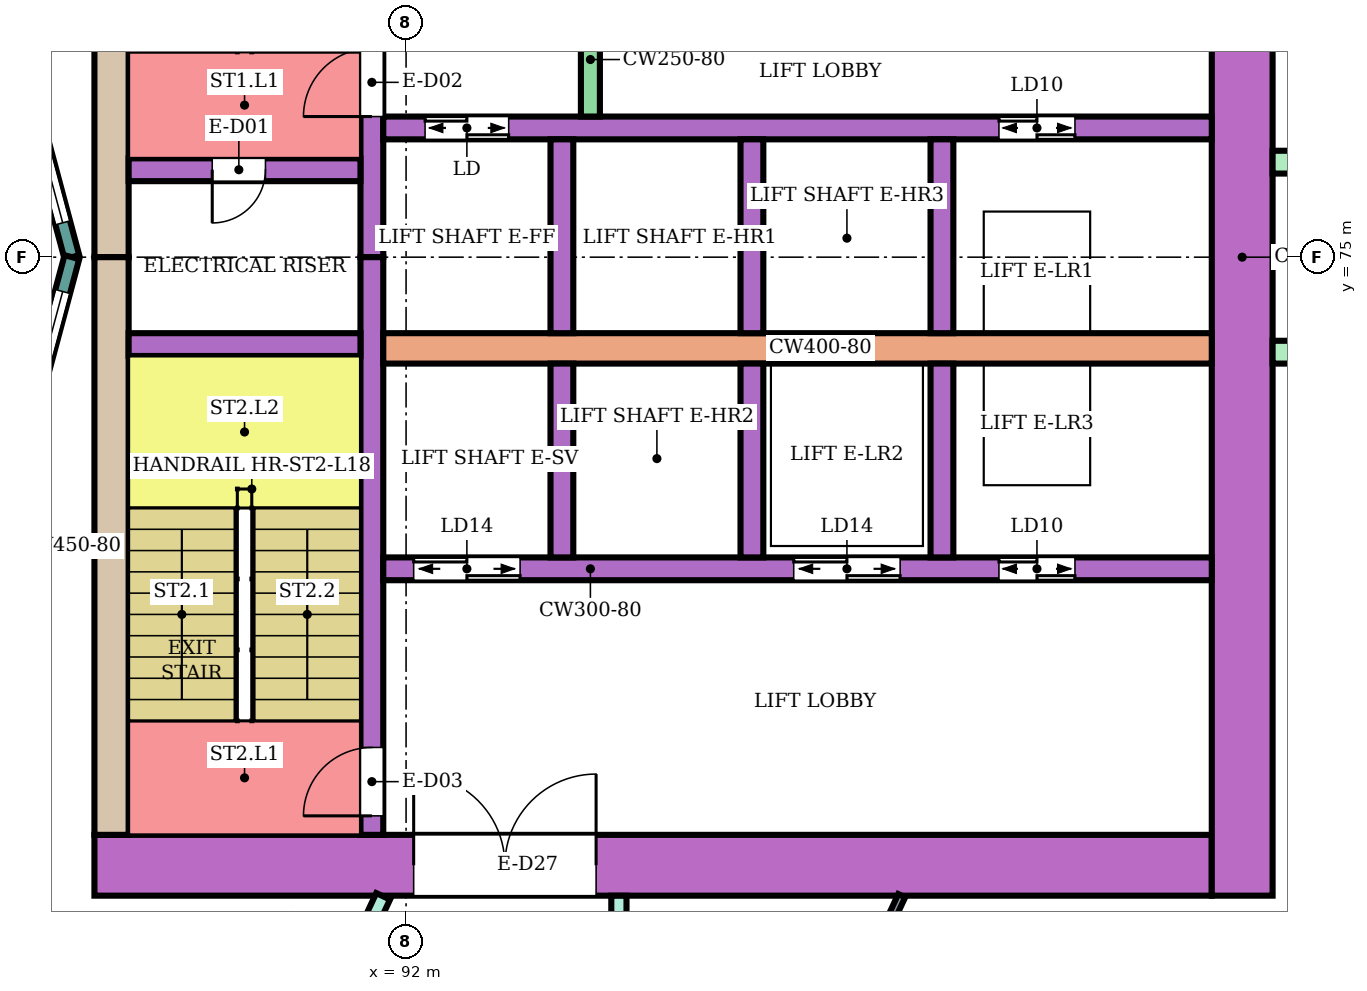
"""IFC4 building model, lengths in metres.
Left out: names, types, materials, properties, quantities, classifications, styles, units other than length and angle.
Written with IfcOpenShell. Run it as: python <this file> out.ifc"""

import sys

from ifc_helpers import new_model, si_unit, direction, frame, frame_2d, origin, place, context, subcontext, project, spatial, rectangle, extrude, element, fill, save


model = new_model("IFC4")
c1 = context("Model", 3, precision=1e-05, world=origin(), true_north=direction((0.0, 1.0)))
c2 = subcontext(c1, "Body", "Model", "MODEL_VIEW")
j1 = project(units=[si_unit("LENGTHUNIT", "METRE"), si_unit("PLANEANGLEUNIT", "RADIAN")], contexts=[c1])
p1 = place(None, origin())
s1 = spatial("IfcSite", under=j1, at=p1, CompositionType="ELEMENT")
p2 = place(p1, origin())
s2 = spatial("IfcBuilding", under=s1, at=p2, CompositionType="ELEMENT")
p3 = place(p2, frame((0.0, 0.0, 82.4)))
s3 = spatial("IfcBuildingStorey", under=s2, at=p3, CompositionType="ELEMENT", Elevation=82.4)
p4 = place(p3, frame((87.9, 67.0, 0.0), z_axis=(0.0, 0.0, 1.0), x_axis=(1.0, 0.0, 0.0)))
e1 = element("IfcWall", 1, at=p4, inside=s3, PredefinedType="SHEAR", context=c2, shape_type="SweptSolid", body=[
    extrude(rectangle(XDim=14.7, YDim=0.8, at=frame_2d((7.35, 0.0))), origin(), (0.0, 0.0, 1.0), 3.48),
])
p5 = place(p4, frame((4.2, 0.0, 0.0)))
e2 = element("IfcOpeningElement", 2, at=p5, cuts=e1, PredefinedType="OPENING", context=c2, shape_type="SweptSolid", body=[
    extrude(rectangle(XDim=2.4, YDim=2.4, at=frame_2d((1.2, 1.2))), frame((0.0, 0.41, 0.0), z_axis=(0.0, -1.0, 0.0), x_axis=(1.0, 0.0, 0.0)), (0.0, 0.0, 1.0), 0.82),
])
for number, where, z_axis, x_axis in (
    (3, (88.125, 75.0, 0.0), (0.0, 0.0, 1.0), (0.0, 1.0, 0.0)),
    (4, (88.125, 67.4, 0.0), (0.0, 0.0, 1.0), (0.0, 1.0, 0.0)),
):
    element("IfcWall", number, at=place(p3, frame(where, z_axis=z_axis, x_axis=x_axis)), inside=s3, PredefinedType="SHEAR", context=c2, shape_type="SweptSolid", body=[
        extrude(rectangle(XDim=7.6, YDim=0.45, at=frame_2d((3.8, 0.0))), origin(), (0.0, 0.0, 1.0), 3.48),
    ])
p6 = place(p3, frame((103.0, 66.6, 0.0), z_axis=(0.0, 0.0, 1.0), x_axis=(0.0, 1.0, 0.0)))
e5 = element("IfcWall", 5, at=p6, inside=s3, PredefinedType="SHEAR", context=c2, shape_type="SweptSolid", body=[
    extrude(rectangle(XDim=16.8, YDim=0.8, at=frame_2d((8.4, 0.0))), origin(), (0.0, 0.0, 1.0), 3.48),
])
p7 = place(p3, frame((91.55, 75.0, 0.0), z_axis=(0.0, 0.0, 1.0), x_axis=(0.0, 1.0, 0.0)))
e6 = element("IfcWall", 6, at=p7, inside=s3, PredefinedType="SHEAR", context=c2, shape_type="SweptSolid", body=[
    extrude(rectangle(XDim=7.6, YDim=0.3, at=frame_2d((3.8, 0.0))), origin(), (0.0, 0.0, 1.0), 3.48),
])
p8 = place(p7, frame((1.85, 0.0, 0.0)))
e7 = element("IfcOpeningElement", 7, at=p8, cuts=e6, PredefinedType="OPENING", context=c2, shape_type="SweptSolid", body=[
    extrude(rectangle(XDim=0.9, YDim=2.1, at=frame_2d((0.45, 1.05))), frame((0.0, 0.16, 0.0), z_axis=(0.0, -1.0, 0.0), x_axis=(1.0, 0.0, 0.0)), (0.0, 0.0, 1.0), 0.32),
])
p9 = place(p3, frame((91.55, 67.4, 0.0), z_axis=(0.0, 0.0, 1.0), x_axis=(0.0, 1.0, 0.0)))
e8 = element("IfcWall", 8, at=p9, inside=s3, PredefinedType="SHEAR", context=c2, shape_type="SweptSolid", body=[
    extrude(rectangle(XDim=7.6, YDim=0.3, at=frame_2d((3.8, 0.0))), origin(), (0.0, 0.0, 1.0), 3.48),
])
p10 = place(p9, frame((0.25, 0.0, 0.0)))
e9 = element("IfcOpeningElement", 9, at=p10, cuts=e8, PredefinedType="OPENING", context=c2, shape_type="SweptSolid", body=[
    extrude(rectangle(XDim=0.9, YDim=2.1, at=frame_2d((0.45, 1.05))), frame((0.0, 0.16, 0.0), z_axis=(0.0, -1.0, 0.0), x_axis=(1.0, 0.0, 0.0)), (0.0, 0.0, 1.0), 0.32),
])
p11 = place(p3, frame((88.35, 76.15, 0.0), z_axis=(0.0, 0.0, 1.0), x_axis=(1.0, 0.0, 0.0)))
e10 = element("IfcWall", 10, at=p11, inside=s3, PredefinedType="SHEAR", context=c2, shape_type="SweptSolid", body=[
    extrude(rectangle(XDim=3.05, YDim=0.3, at=frame_2d((1.525, 0.0))), origin(), (0.0, 0.0, 1.0), 3.48),
])
p12 = place(p11, frame((1.1, 0.0, 0.0)))
e11 = element("IfcOpeningElement", 11, at=p12, cuts=e10, PredefinedType="OPENING", context=c2, shape_type="SweptSolid", body=[
    extrude(rectangle(XDim=0.7, YDim=2.0, at=frame_2d((0.35, 1.0))), frame((0.0, 0.16, 0.0), z_axis=(0.0, -1.0, 0.0), x_axis=(1.0, 0.0, 0.0)), (0.0, 0.0, 1.0), 0.32),
])
p13 = place(p3, frame((88.35, 73.85, 0.0), z_axis=(0.0, 0.0, 1.0), x_axis=(1.0, 0.0, 0.0)))
e12 = element("IfcWall", 12, at=p13, inside=s3, PredefinedType="SHEAR", context=c2, shape_type="SweptSolid", body=[
    extrude(rectangle(XDim=3.05, YDim=0.3, at=frame_2d((1.525, 0.0))), origin(), (0.0, 0.0, 1.0), 3.48),
])
p14 = place(p3, frame((91.7, 76.7, 0.0), z_axis=(0.0, 0.0, 1.0), x_axis=(1.0, 0.0, 0.0)))
e13 = element("IfcWall", 13, at=p14, inside=s3, PredefinedType="SHEAR", context=c2, shape_type="SweptSolid", body=[
    extrude(rectangle(XDim=10.9, YDim=0.3, at=frame_2d((5.45, 0.0))), origin(), (0.0, 0.0, 1.0), 3.48),
])
p15 = place(p14, frame((0.55, 0.0, 0.0)))
e14 = element("IfcOpeningElement", 14, at=p15, cuts=e13, PredefinedType="OPENING", context=c2, shape_type="SweptSolid", body=[
    extrude(rectangle(XDim=1.1, YDim=2.1, at=frame_2d((0.55, 1.05))), frame((0.0, 0.16, 0.0), z_axis=(0.0, -1.0, 0.0), x_axis=(1.0, 0.0, 0.0)), (0.0, 0.0, 1.0), 0.32),
])
p16 = place(p14, frame((8.1, 0.0, 0.0)))
e15 = element("IfcOpeningElement", 15, at=p16, cuts=e13, PredefinedType="OPENING", context=c2, shape_type="SweptSolid", body=[
    extrude(rectangle(XDim=1.0, YDim=2.1, at=frame_2d((0.5, 1.05))), frame((0.0, 0.16, 0.0), z_axis=(0.0, -1.0, 0.0), x_axis=(1.0, 0.0, 0.0)), (0.0, 0.0, 1.0), 0.32),
])
p17 = place(p3, frame((91.7, 73.8, 0.0), z_axis=(0.0, 0.0, 1.0), x_axis=(1.0, 0.0, 0.0)))
e16 = element("IfcWall", 16, at=p17, inside=s3, PredefinedType="SHEAR", context=c2, shape_type="SweptSolid", body=[
    extrude(rectangle(XDim=10.9, YDim=0.4, at=frame_2d((5.45, 0.0))), origin(), (0.0, 0.0, 1.0), 3.48),
])
p18 = place(p3, frame((91.7, 70.9, 0.0), z_axis=(0.0, 0.0, 1.0), x_axis=(1.0, 0.0, 0.0)))
e17 = element("IfcWall", 17, at=p18, inside=s3, PredefinedType="SHEAR", context=c2, shape_type="SweptSolid", body=[
    extrude(rectangle(XDim=10.9, YDim=0.3, at=frame_2d((5.45, 0.0))), origin(), (0.0, 0.0, 1.0), 3.48),
])
p19 = place(p18, frame((0.4, 0.0, 0.0)))
e18 = element("IfcOpeningElement", 18, at=p19, cuts=e17, PredefinedType="OPENING", context=c2, shape_type="SweptSolid", body=[
    extrude(rectangle(XDim=1.4, YDim=2.1, at=frame_2d((0.7, 1.05))), frame((0.0, 0.16, 0.0), z_axis=(0.0, -1.0, 0.0), x_axis=(1.0, 0.0, 0.0)), (0.0, 0.0, 1.0), 0.32),
])
p20 = place(p18, frame((5.4, 0.0, 0.0)))
e19 = element("IfcOpeningElement", 19, at=p20, cuts=e17, PredefinedType="OPENING", context=c2, shape_type="SweptSolid", body=[
    extrude(rectangle(XDim=1.4, YDim=2.1, at=frame_2d((0.7, 1.05))), frame((0.0, 0.16, 0.0), z_axis=(0.0, -1.0, 0.0), x_axis=(1.0, 0.0, 0.0)), (0.0, 0.0, 1.0), 0.32),
])
p21 = place(p18, frame((8.1, 0.0, 0.0)))
e20 = element("IfcOpeningElement", 20, at=p21, cuts=e17, PredefinedType="OPENING", context=c2, shape_type="SweptSolid", body=[
    extrude(rectangle(XDim=1.0, YDim=2.1, at=frame_2d((0.5, 1.05))), frame((0.0, 0.16, 0.0), z_axis=(0.0, -1.0, 0.0), x_axis=(1.0, 0.0, 0.0)), (0.0, 0.0, 1.0), 0.32),
])
for number, where, z_axis, x_axis in (
    (21, (94.05, 74.0, 0.0), (0.0, 0.0, 1.0), (0.0, 1.0, 0.0)),
    (22, (96.55, 74.0, 0.0), (0.0, 0.0, 1.0), (0.0, 1.0, 0.0)),
    (23, (99.05, 74.0, 0.0), (0.0, 0.0, 1.0), (0.0, 1.0, 0.0)),
    (24, (94.05, 71.05, 0.0), (0.0, 0.0, 1.0), (0.0, 1.0, 0.0)),
    (25, (96.55, 71.05, 0.0), (0.0, 0.0, 1.0), (0.0, 1.0, 0.0)),
    (26, (99.05, 71.05, 0.0), (0.0, 0.0, 1.0), (0.0, 1.0, 0.0)),
):
    element("IfcWall", number, at=place(p3, frame(where, z_axis=z_axis, x_axis=x_axis)), inside=s3, PredefinedType="SHEAR", context=c2, shape_type="SweptSolid", body=[
        extrude(rectangle(XDim=2.55, YDim=0.3, at=frame_2d((1.275, 0.0))), origin(), (0.0, 0.0, 1.0), 3.48),
    ])
p22 = place(p3, frame((94.425, 76.85, 0.0), z_axis=(0.0, 0.0, 1.0), x_axis=(0.0, 1.0, 0.0)))
e27 = element("IfcWall", 27, at=p22, inside=s3, PredefinedType="SHEAR", context=c2, shape_type="SweptSolid", body=[
    extrude(rectangle(XDim=1.5, YDim=0.25, at=frame_2d((0.75, 0.0))), origin(), (0.0, 0.0, 1.0), 3.48),
])
for number, where, z_axis, x_axis in (
    (28, (103.4, 73.75, 0.0), (0.0, 0.0, 1.0), (1.0, 0.0, 0.0)),
    (29, (103.4, 76.25, 0.0), (0.0, 0.0, 1.0), (1.0, 0.0, 0.0)),
):
    element("IfcWall", number, at=place(p3, frame(where, z_axis=z_axis, x_axis=x_axis)), inside=s3, PredefinedType="NOTDEFINED", context=c2, shape_type="SweptSolid", body=[
        extrude(rectangle(XDim=2.416, YDim=0.3, at=frame_2d((1.208, 0.0))), origin(), (0.0, 0.0, 1.0), 3.8),
    ])
p23 = place(p3, frame((87.604, 75.0, 0.0), z_axis=(0.0, 0.0, 1.0), x_axis=(-0.258789828301, 0.965933654434, 0.0)))
e30 = element("IfcWall", 30, at=p23, inside=s3, PredefinedType="NOTDEFINED", context=c2, shape_type="SweptSolid", body=[
    extrude(rectangle(XDim=3.936, YDim=0.2, at=frame_2d((1.968, 0.0))), origin(), (0.0, 0.0, 1.0), 3.8),
])
p24 = place(p23, frame((0.468, 0.0, 0.9)))
e31 = element("IfcOpeningElement", 31, at=p24, cuts=e30, PredefinedType="OPENING", context=c2, shape_type="SweptSolid", body=[
    extrude(rectangle(XDim=3.0, YDim=2.3, at=frame_2d((1.5, 1.15))), frame((0.0, 0.11, 0.0), z_axis=(0.0, -1.0, 0.0), x_axis=(1.0, 0.0, 0.0)), (0.0, 0.0, 1.0), 0.22),
])
p25 = place(p3, frame((86.585, 71.198, 0.0), z_axis=(0.0, 0.0, 1.0), x_axis=(0.258789828301, 0.965933654434, 0.0)))
e32 = element("IfcWall", 32, at=p25, inside=s3, PredefinedType="NOTDEFINED", context=c2, shape_type="SweptSolid", body=[
    extrude(rectangle(XDim=3.936, YDim=0.2, at=frame_2d((1.968, 0.0))), origin(), (0.0, 0.0, 1.0), 3.8),
])
p26 = place(p25, frame((0.468, 0.0, 0.9)))
e33 = element("IfcOpeningElement", 33, at=p26, cuts=e32, PredefinedType="OPENING", context=c2, shape_type="SweptSolid", body=[
    extrude(rectangle(XDim=3.0, YDim=2.3, at=frame_2d((1.5, 1.15))), frame((0.0, 0.11, 0.0), z_axis=(0.0, -1.0, 0.0), x_axis=(1.0, 0.0, 0.0)), (0.0, 0.0, 1.0), 0.22),
])
p27 = place(p3, frame((83.846, 68.33, 0.0), z_axis=(0.0, 0.0, 1.0), x_axis=(0.499822319857, -0.866127963163, 0.0)))
e34 = element("IfcWall", 34, at=p27, inside=s3, PredefinedType="PARTITIONING", context=c2, shape_type="SweptSolid", body=[
    extrude(rectangle(XDim=9.382, YDim=0.2, at=frame_2d((4.691, 0.0))), origin(), (0.0, 0.0, 1.0), 3.35),
])
p28 = place(p3, frame((88.501, 59.775, 0.0), z_axis=(0.0, 0.0, 1.0), x_axis=(0.424700525505, 0.905333896215, 0.0)))
e35 = element("IfcWall", 35, at=p28, inside=s3, PredefinedType="PARTITIONING", context=c2, shape_type="SweptSolid", body=[
    extrude(rectangle(XDim=7.53, YDim=0.2, at=frame_2d((3.765, 0.0))), origin(), (0.0, 0.0, 1.0), 3.35),
])
p29 = place(p28, frame((5.83, 0.0, 0.0)))
e36 = element("IfcOpeningElement", 36, at=p29, cuts=e35, PredefinedType="OPENING", context=c2, shape_type="SweptSolid", body=[
    extrude(rectangle(XDim=1.0, YDim=2.1, at=frame_2d((0.5, 1.05))), frame((0.0, 0.11, 0.0), z_axis=(0.0, -1.0, 0.0), x_axis=(1.0, 0.0, 0.0)), (0.0, 0.0, 1.0), 0.22),
])
p30 = place(p3, frame((94.8, 65.1, 0.0), z_axis=(0.0, 0.0, 1.0), x_axis=(0.0, 1.0, 0.0)))
e37 = element("IfcWall", 37, at=p30, inside=s3, PredefinedType="PARTITIONING", context=c2, shape_type="SweptSolid", body=[
    extrude(rectangle(XDim=1.499, YDim=0.2, at=frame_2d((0.75, 0.0))), origin(), (0.0, 0.0, 1.0), 3.35),
])
p31 = place(p3, frame((95.355, 59.806, 0.0), z_axis=(0.0, 0.0, 1.0), x_axis=(0.422407546544, 0.906406015328, 0.0)))
e38 = element("IfcWall", 38, at=p31, inside=s3, PredefinedType="PARTITIONING", context=c2, shape_type="SweptSolid", body=[
    extrude(rectangle(XDim=7.496, YDim=0.1, at=frame_2d((3.748, 0.0))), origin(), (0.0, 0.0, 1.0), 3.35),
])
p32 = place(p31, frame((3.238, 0.0, 0.0)))
e39 = element("IfcOpeningElement", 39, at=p32, cuts=e38, PredefinedType="OPENING", context=c2, shape_type="SweptSolid", body=[
    extrude(rectangle(XDim=0.9, YDim=2.1, at=frame_2d((0.45, 1.05))), frame((0.0, 0.06, 0.0), z_axis=(0.0, -1.0, 0.0), x_axis=(1.0, 0.0, 0.0)), (0.0, 0.0, 1.0), 0.12),
])
p33 = place(p24, origin())
e40 = element("IfcWindow", 40, at=p33, inside=s3, PartitioningType="SINGLE_PANEL", PredefinedType="WINDOW", context=c2, shape_type="SweptSolid", body=[
    extrude(rectangle(XDim=3.0, YDim=2.3, at=frame_2d((1.5, 1.15))), frame((0.0, 0.03, 0.0), z_axis=(0.0, -1.0, 0.0), x_axis=(1.0, 0.0, 0.0)), (0.0, 0.0, 1.0), 0.06),
])
fill(e31, e40)
p34 = place(p26, origin())
e41 = element("IfcWindow", 41, at=p34, inside=s3, PartitioningType="SINGLE_PANEL", PredefinedType="WINDOW", context=c2, shape_type="SweptSolid", body=[
    extrude(rectangle(XDim=3.0, YDim=2.3, at=frame_2d((1.5, 1.15))), frame((0.0, 0.03, 0.0), z_axis=(0.0, -1.0, 0.0), x_axis=(1.0, 0.0, 0.0)), (0.0, 0.0, 1.0), 0.06),
])
fill(e33, e41)
p35 = place(p12, frame((0.7, 0.0, 0.0), z_axis=(0.0, 0.0, 1.0), x_axis=(-1.0, 0.0, 0.0)))
e42 = element("IfcDoor", 42, at=p35, inside=s3, OperationType="SINGLE_SWING_RIGHT", PredefinedType="DOOR", context=c2, shape_type="SweptSolid", body=[
    extrude(rectangle(XDim=0.7, YDim=2.0, at=frame_2d((0.35, 1.0))), frame((0.0, 0.025, 0.0), z_axis=(0.0, -1.0, 0.0), x_axis=(1.0, 0.0, 0.0)), (0.0, 0.0, 1.0), 0.05),
])
fill(e11, e42)
p36 = place(p8, origin())
e43 = element("IfcDoor", 43, at=p36, inside=s3, OperationType="SINGLE_SWING_LEFT", PredefinedType="DOOR", context=c2, shape_type="SweptSolid", body=[
    extrude(rectangle(XDim=0.9, YDim=2.1, at=frame_2d((0.45, 1.05))), frame((0.0, 0.025, 0.0), z_axis=(0.0, -1.0, 0.0), x_axis=(1.0, 0.0, 0.0)), (0.0, 0.0, 1.0), 0.05),
])
fill(e7, e43)
p37 = place(p10, origin())
e44 = element("IfcDoor", 44, at=p37, inside=s3, OperationType="SINGLE_SWING_LEFT", PredefinedType="DOOR", context=c2, shape_type="SweptSolid", body=[
    extrude(rectangle(XDim=0.9, YDim=2.1, at=frame_2d((0.45, 1.05))), frame((0.0, 0.025, 0.0), z_axis=(0.0, -1.0, 0.0), x_axis=(1.0, 0.0, 0.0)), (0.0, 0.0, 1.0), 0.05),
])
fill(e9, e44)
p38 = place(p15, origin())
e45 = element("IfcDoor", 45, at=p38, inside=s3, OperationType="DOUBLE_DOOR_SLIDING", PredefinedType="DOOR", context=c2, shape_type="SweptSolid", body=[
    extrude(rectangle(XDim=1.1, YDim=2.1, at=frame_2d((0.55, 1.05))), frame((0.0, 0.025, 0.0), z_axis=(0.0, -1.0, 0.0), x_axis=(1.0, 0.0, 0.0)), (0.0, 0.0, 1.0), 0.05),
])
fill(e14, e45)
p39 = place(p16, origin())
e46 = element("IfcDoor", 46, at=p39, inside=s3, OperationType="DOUBLE_DOOR_SLIDING", PredefinedType="DOOR", context=c2, shape_type="SweptSolid", body=[
    extrude(rectangle(XDim=1.0, YDim=2.1, at=frame_2d((0.5, 1.05))), frame((0.0, 0.025, 0.0), z_axis=(0.0, -1.0, 0.0), x_axis=(1.0, 0.0, 0.0)), (0.0, 0.0, 1.0), 0.05),
])
fill(e15, e46)
p40 = place(p19, origin())
e47 = element("IfcDoor", 47, at=p40, inside=s3, OperationType="DOUBLE_DOOR_SLIDING", PredefinedType="DOOR", context=c2, shape_type="SweptSolid", body=[
    extrude(rectangle(XDim=1.4, YDim=2.1, at=frame_2d((0.7, 1.05))), frame((0.0, 0.025, 0.0), z_axis=(0.0, -1.0, 0.0), x_axis=(1.0, 0.0, 0.0)), (0.0, 0.0, 1.0), 0.05),
])
fill(e18, e47)
p41 = place(p20, origin())
e48 = element("IfcDoor", 48, at=p41, inside=s3, OperationType="DOUBLE_DOOR_SLIDING", PredefinedType="DOOR", context=c2, shape_type="SweptSolid", body=[
    extrude(rectangle(XDim=1.4, YDim=2.1, at=frame_2d((0.7, 1.05))), frame((0.0, 0.025, 0.0), z_axis=(0.0, -1.0, 0.0), x_axis=(1.0, 0.0, 0.0)), (0.0, 0.0, 1.0), 0.05),
])
fill(e19, e48)
p42 = place(p21, origin())
e49 = element("IfcDoor", 49, at=p42, inside=s3, OperationType="DOUBLE_DOOR_SLIDING", PredefinedType="DOOR", context=c2, shape_type="SweptSolid", body=[
    extrude(rectangle(XDim=1.0, YDim=2.1, at=frame_2d((0.5, 1.05))), frame((0.0, 0.025, 0.0), z_axis=(0.0, -1.0, 0.0), x_axis=(1.0, 0.0, 0.0)), (0.0, 0.0, 1.0), 0.05),
])
fill(e20, e49)
p43 = place(p5, origin())
e50 = element("IfcDoor", 50, at=p43, inside=s3, OperationType="DOUBLE_DOOR_SINGLE_SWING", PredefinedType="DOOR", context=c2, shape_type="SweptSolid", body=[
    extrude(rectangle(XDim=2.4, YDim=2.4, at=frame_2d((1.2, 1.2))), frame((0.0, 0.025, 0.0), z_axis=(0.0, -1.0, 0.0), x_axis=(1.0, 0.0, 0.0)), (0.0, 0.0, 1.0), 0.05),
])
fill(e2, e50)
save(model, sys.argv[1])
